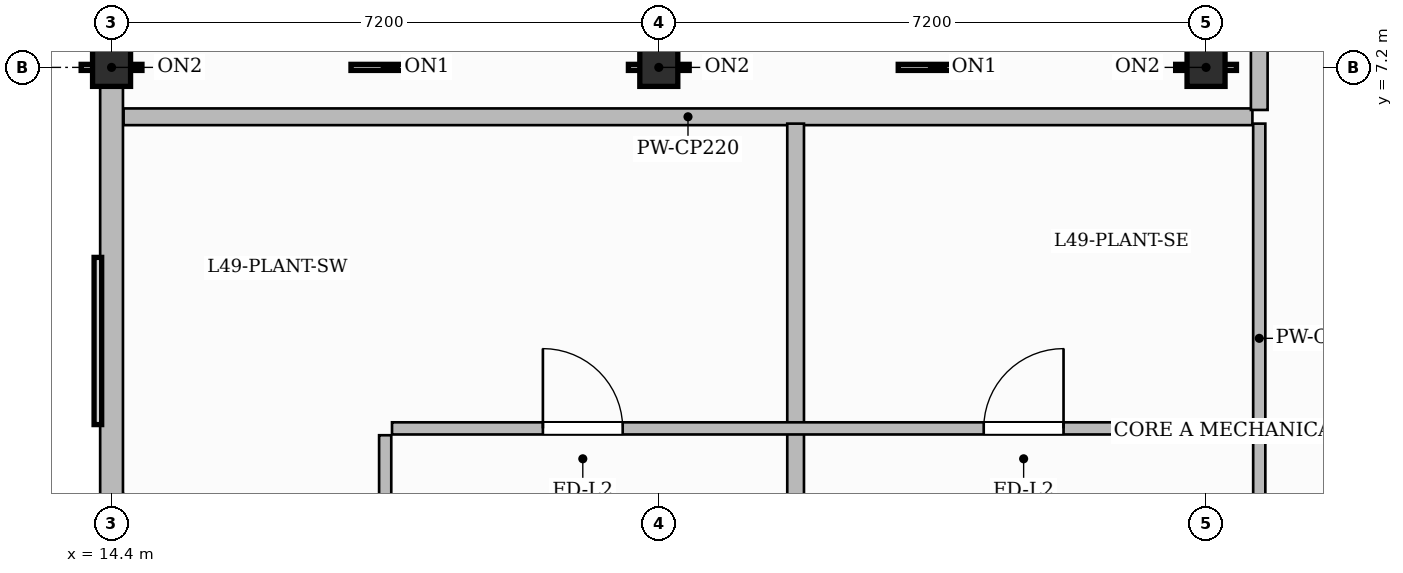
"""IFC4 building model, lengths in metres.
Left out: names, types, materials, properties, quantities, classifications, styles, units other than length and angle.
Written with IfcOpenShell. Run it as: python <this file> out.ifc"""

import sys

from ifc_helpers import new_model, si_unit, direction, frame, frame_2d, origin, origin_2d, place, context, subcontext, project, spatial, rectangle, hollow_rectangle, extrude, source, transform, mapped, element, fill, save


model = new_model("IFC4")
c1 = context("Model", 3, precision=1e-05, world=origin(), true_north=direction((0.0, 1.0)))
c2 = subcontext(c1, "Body", "Model", "MODEL_VIEW")
j1 = project(units=[si_unit("LENGTHUNIT", "METRE"), si_unit("PLANEANGLEUNIT", "RADIAN")], contexts=[c1])
p1 = place(None, origin())
s1 = spatial("IfcSite", under=j1, at=p1, CompositionType="ELEMENT")
p2 = place(p1, origin())
s2 = spatial("IfcBuilding", under=s1, at=p2, CompositionType="ELEMENT")
p3 = place(p2, frame((0.0, 0.0, 196.5)))
s3 = spatial("IfcBuildingStorey", under=s2, at=p3, CompositionType="ELEMENT", Elevation=196.5)
m1 = source(origin(), c2, "Body", "SweptSolid", [
    extrude(hollow_rectangle(XDim=0.5, YDim=0.5, WallThickness=0.03, InnerFilletRadius=0.03, OuterFilletRadius=0.06, at=origin_2d()), origin(), (0.0, 0.0, 1.0), 5.4),
])
for number, where, z_axis, x_axis in (
    (1, (14.4, 7.2, 0.0), (0.0, 0.0, 1.0), (1.0, 0.0, 0.0)),
    (2, (21.6, 7.2, 0.0), (0.0, 0.0, 1.0), (1.0, 0.0, 0.0)),
    (3, (28.8, 7.2, 0.0), (0.0, 0.0, 1.0), (1.0, 0.0, 0.0)),
):
    element("IfcColumn", number, at=place(p3, frame(where, z_axis=z_axis, x_axis=x_axis)), inside=s3, PredefinedType="COLUMN", context=c2, shape_type="MappedRepresentation", body=[
        mapped(m1, transform((0.0, 0.0, 0.0), scale=1.0)),
    ])
p4 = place(p3, frame((14.558, 6.55, 0.0), z_axis=(0.0, 0.0, 1.0), x_axis=(1.0, 0.0, 0.0)))
e4 = element("IfcWall", 4, at=p4, inside=s3, PredefinedType="PARTITIONING", context=c2, shape_type="SweptSolid", body=[
    extrude(rectangle(XDim=14.852, YDim=0.22, at=frame_2d((7.426, 0.0))), origin(), (0.0, 0.0, 1.0), 5.15),
])
p5 = place(p3, frame((29.5, 6.64, 0.0), z_axis=(0.0, 0.0, 1.0), x_axis=(0.0, 1.0, 0.0)))
e5 = element("IfcWall", 5, at=p5, inside=s3, PredefinedType="PARTITIONING", context=c2, shape_type="SweptSolid", body=[
    extrude(rectangle(XDim=1.12, YDim=0.22, at=frame_2d((0.56, 0.0))), origin(), (0.0, 0.0, 1.0), 5.15),
])
p6 = place(p3, frame((23.4, 0.81, 0.0), z_axis=(0.0, 0.0, 1.0), x_axis=(0.0, 1.0, 0.0)))
e6 = element("IfcWall", 6, at=p6, inside=s3, PredefinedType="PARTITIONING", context=c2, shape_type="SweptSolid", body=[
    extrude(rectangle(XDim=5.65, YDim=0.22, at=frame_2d((2.825, 0.0))), origin(), (0.0, 0.0, 1.0), 5.15),
])
p7 = place(p3, frame((29.5, 0.81, 0.0), z_axis=(0.0, 0.0, 1.0), x_axis=(0.0, 1.0, 0.0)))
e7 = element("IfcWall", 7, at=p7, inside=s3, PredefinedType="PARTITIONING", context=c2, shape_type="SweptSolid", body=[
    extrude(rectangle(XDim=5.65, YDim=0.16, at=frame_2d((2.825, 0.0))), origin(), (0.0, 0.0, 1.0), 5.15),
])
p8 = place(p3, frame((18.09, 2.45, 0.0), z_axis=(0.0, 0.0, 1.0), x_axis=(1.0, 0.0, 0.0)))
e8 = element("IfcWall", 8, at=p8, inside=s3, PredefinedType="PARTITIONING", context=c2, shape_type="SweptSolid", body=[
    extrude(rectangle(XDim=11.32, YDim=0.16, at=frame_2d((5.66, 0.0))), origin(), (0.0, 0.0, 1.0), 5.15),
])
p9 = place(p8, frame((1.985, 0.0, 0.0)))
e9 = element("IfcOpeningElement", 9, at=p9, cuts=e8, PredefinedType="OPENING", context=c2, shape_type="SweptSolid", body=[
    extrude(rectangle(XDim=1.05, YDim=2.15, at=frame_2d((0.525, 1.075))), frame((0.0, 0.09, 0.0), z_axis=(0.0, -1.0, 0.0), x_axis=(1.0, 0.0, 0.0)), (0.0, 0.0, 1.0), 0.18),
])
p10 = place(p8, frame((7.785, 0.0, 0.0)))
e10 = element("IfcOpeningElement", 10, at=p10, cuts=e8, PredefinedType="OPENING", context=c2, shape_type="SweptSolid", body=[
    extrude(rectangle(XDim=1.05, YDim=2.15, at=frame_2d((0.525, 1.075))), frame((0.0, 0.09, 0.0), z_axis=(0.0, -1.0, 0.0), x_axis=(1.0, 0.0, 0.0)), (0.0, 0.0, 1.0), 0.18),
])
p11 = place(p3, frame((18.0, 0.81, 0.0), z_axis=(0.0, 0.0, 1.0), x_axis=(0.0, 1.0, 0.0)))
e11 = element("IfcWall", 11, at=p11, inside=s3, PredefinedType="PARTITIONING", context=c2, shape_type="SweptSolid", body=[
    extrude(rectangle(XDim=1.55, YDim=0.16, at=frame_2d((0.775, 0.0))), origin(), (0.0, 0.0, 1.0), 4.685),
])
p12 = place(p3, frame((14.4, 0.05, 0.0), z_axis=(0.0, 0.0, 1.0), x_axis=(0.0, 1.0, 0.0)))
e12 = element("IfcWall", 12, at=p12, inside=s3, PredefinedType="SOLIDWALL", context=c2, shape_type="SweptSolid", body=[
    extrude(rectangle(XDim=25.1, YDim=0.3, at=frame_2d((12.55, 0.0))), origin(), (0.0, 0.0, 1.0), 4.485),
])
m2 = source(origin(), c2, "Body", "SweptSolid", [
    extrude(rectangle(XDim=1.05, YDim=2.15, at=frame_2d((0.525, 1.075))), frame((0.0, 0.025, 0.0), z_axis=(0.0, -1.0, 0.0), x_axis=(1.0, 0.0, 0.0)), (0.0, 0.0, 1.0), 0.05),
])
p13 = place(p9, origin())
e13 = element("IfcDoor", 13, at=p13, inside=s3, OperationType="SINGLE_SWING_LEFT", PredefinedType="DOOR", context=c2, shape_type="MappedRepresentation", body=[
    mapped(m2, transform((0.0, 0.0, 0.0), scale=1.0)),
])
fill(e9, e13)
p14 = place(p10, origin())
e14 = element("IfcDoor", 14, at=p14, inside=s3, OperationType="SINGLE_SWING_RIGHT", PredefinedType="DOOR", context=c2, shape_type="MappedRepresentation", body=[
    mapped(m2, transform((0.0, 0.0, 0.0), scale=1.0)),
])
fill(e10, e14)
save(model, sys.argv[1])
